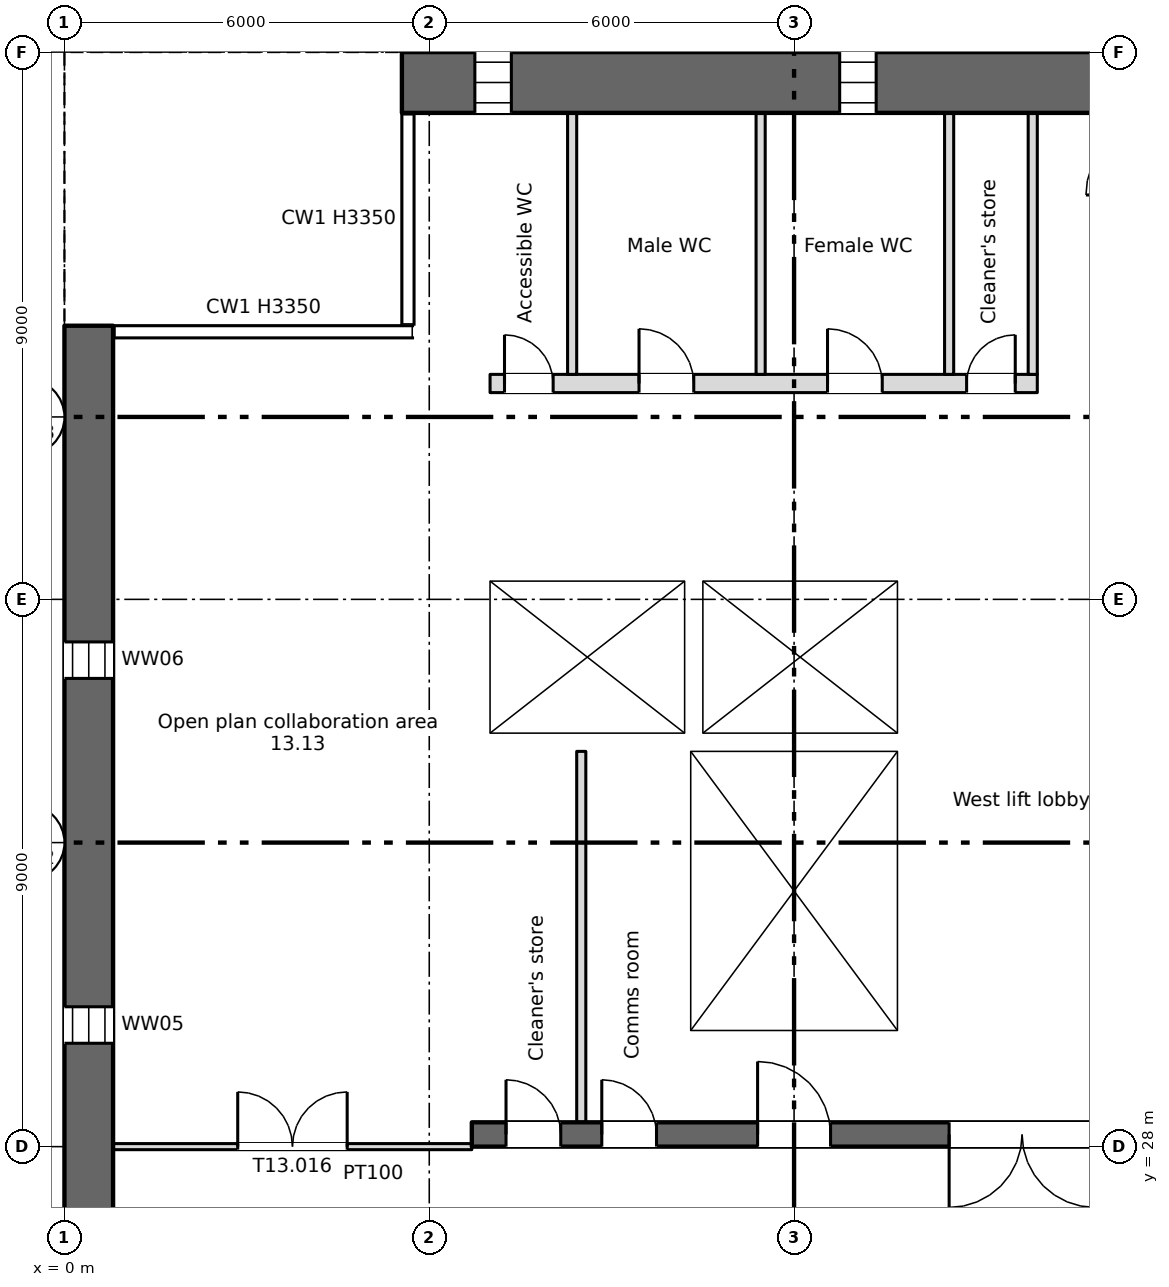
"""IFC4 building model, lengths in metres.
Left out: names, types, materials, properties, quantities, classifications, styles, units other than length and angle.
Written with IfcOpenShell. Run it as: python <this file> out.ifc"""

import sys

from ifc_helpers import new_model, si_unit, direction, frame, frame_2d, origin, place, context, subcontext, project, spatial, rectangle, extrude, element, fill, save


model = new_model("IFC4")
c1 = context("Model", 3, precision=1e-05, world=origin(), true_north=direction((0.0, 1.0)))
c2 = subcontext(c1, "Body", "Model", "MODEL_VIEW")
j1 = project(units=[si_unit("LENGTHUNIT", "METRE"), si_unit("PLANEANGLEUNIT", "RADIAN")], contexts=[c1])
p1 = place(None, origin())
s1 = spatial("IfcSite", under=j1, at=p1, CompositionType="ELEMENT")
p2 = place(p1, origin())
s2 = spatial("IfcBuilding", under=s1, at=p2, CompositionType="ELEMENT")
p3 = place(p2, frame((0.0, 0.0, 67.5)))
s3 = spatial("IfcBuildingStorey", under=s2, at=p3, CompositionType="ELEMENT", Elevation=67.5)
p4 = place(p3, frame((0.4, 4.5, 0.0), z_axis=(0.0, 0.0, 1.0), x_axis=(0.0, 1.0, 0.0)))
e1 = element("IfcWall", 1, at=p4, inside=s3, PredefinedType="SHEAR", context=c2, shape_type="SweptSolid", body=[
    extrude(rectangle(XDim=37.0, YDim=0.8, at=frame_2d((18.5, 0.0))), origin(), (0.0, 0.0, 1.0), 3.35),
])
p5 = place(p4, frame((1.2, 0.0, 0.6)))
e2 = element("IfcOpeningElement", 2, at=p5, cuts=e1, PredefinedType="OPENING", context=c2, shape_type="SweptSolid", body=[
    extrude(rectangle(XDim=0.6, YDim=2.4, at=frame_2d((0.3, 1.2))), frame((0.0, 0.41, 0.0), z_axis=(0.0, -1.0, 0.0), x_axis=(1.0, 0.0, 0.0)), (0.0, 0.0, 1.0), 0.82),
])
p6 = place(p4, frame((7.2, 0.0, 0.6)))
e3 = element("IfcOpeningElement", 3, at=p6, cuts=e1, PredefinedType="OPENING", context=c2, shape_type="SweptSolid", body=[
    extrude(rectangle(XDim=0.6, YDim=2.4, at=frame_2d((0.3, 1.2))), frame((0.0, 0.41, 0.0), z_axis=(0.0, -1.0, 0.0), x_axis=(1.0, 0.0, 0.0)), (0.0, 0.0, 1.0), 0.82),
])
p7 = place(p4, frame((13.2, 0.0, 0.6)))
e4 = element("IfcOpeningElement", 4, at=p7, cuts=e1, PredefinedType="OPENING", context=c2, shape_type="SweptSolid", body=[
    extrude(rectangle(XDim=0.6, YDim=2.4, at=frame_2d((0.3, 1.2))), frame((0.0, 0.41, 0.0), z_axis=(0.0, -1.0, 0.0), x_axis=(1.0, 0.0, 0.0)), (0.0, 0.0, 1.0), 0.82),
])
p8 = place(p4, frame((19.2, 0.0, 0.6)))
e5 = element("IfcOpeningElement", 5, at=p8, cuts=e1, PredefinedType="OPENING", context=c2, shape_type="SweptSolid", body=[
    extrude(rectangle(XDim=0.6, YDim=2.4, at=frame_2d((0.3, 1.2))), frame((0.0, 0.41, 0.0), z_axis=(0.0, -1.0, 0.0), x_axis=(1.0, 0.0, 0.0)), (0.0, 0.0, 1.0), 0.82),
])
p9 = place(p4, frame((25.2, 0.0, 0.6)))
e6 = element("IfcOpeningElement", 6, at=p9, cuts=e1, PredefinedType="OPENING", context=c2, shape_type="SweptSolid", body=[
    extrude(rectangle(XDim=0.6, YDim=2.4, at=frame_2d((0.3, 1.2))), frame((0.0, 0.41, 0.0), z_axis=(0.0, -1.0, 0.0), x_axis=(1.0, 0.0, 0.0)), (0.0, 0.0, 1.0), 0.82),
])
p10 = place(p4, frame((31.2, 0.0, 0.6)))
e7 = element("IfcOpeningElement", 7, at=p10, cuts=e1, PredefinedType="OPENING", context=c2, shape_type="SweptSolid", body=[
    extrude(rectangle(XDim=0.6, YDim=2.4, at=frame_2d((0.3, 1.2))), frame((0.0, 0.41, 0.0), z_axis=(0.0, -1.0, 0.0), x_axis=(1.0, 0.0, 0.0)), (0.0, 0.0, 1.0), 0.82),
])
p11 = place(p3, frame((5.55, 45.5, 0.0), z_axis=(0.0, 0.0, 1.0), x_axis=(1.0, 0.0, 0.0)))
e8 = element("IfcWall", 8, at=p11, inside=s3, PredefinedType="SHEAR", context=c2, shape_type="SweptSolid", body=[
    extrude(rectangle(XDim=66.9, YDim=1.0, at=frame_2d((33.45, 0.0))), origin(), (0.0, 0.0, 1.0), 3.35),
])
p12 = place(p11, frame((1.2, 0.0, 0.6)))
e9 = element("IfcOpeningElement", 9, at=p12, cuts=e8, PredefinedType="OPENING", context=c2, shape_type="SweptSolid", body=[
    extrude(rectangle(XDim=0.6, YDim=2.4, at=frame_2d((0.3, 1.2))), frame((0.0, 0.51, 0.0), z_axis=(0.0, -1.0, 0.0), x_axis=(1.0, 0.0, 0.0)), (0.0, 0.0, 1.0), 1.02),
])
p13 = place(p11, frame((7.2, 0.0, 0.6)))
e10 = element("IfcOpeningElement", 10, at=p13, cuts=e8, PredefinedType="OPENING", context=c2, shape_type="SweptSolid", body=[
    extrude(rectangle(XDim=0.6, YDim=2.4, at=frame_2d((0.3, 1.2))), frame((0.0, 0.51, 0.0), z_axis=(0.0, -1.0, 0.0), x_axis=(1.0, 0.0, 0.0)), (0.0, 0.0, 1.0), 1.02),
])
p14 = place(p11, frame((61.2, 0.0, 0.6)))
e11 = element("IfcOpeningElement", 11, at=p14, cuts=e8, PredefinedType="OPENING", context=c2, shape_type="SweptSolid", body=[
    extrude(rectangle(XDim=0.6, YDim=2.4, at=frame_2d((0.3, 1.2))), frame((0.0, 0.51, 0.0), z_axis=(0.0, -1.0, 0.0), x_axis=(1.0, 0.0, 0.0)), (0.0, 0.0, 1.0), 1.02),
])
p15 = place(p3, frame((6.7, 28.2, 0.0), z_axis=(0.0, 0.0, 1.0), x_axis=(1.0, 0.0, 0.0)))
e12 = element("IfcWall", 12, at=p15, inside=s3, PredefinedType="SHEAR", context=c2, shape_type="SweptSolid", body=[
    extrude(rectangle(XDim=57.8, YDim=0.4, at=frame_2d((28.9, 0.0))), origin(), (0.0, 0.0, 1.0), 3.35),
])
p16 = place(p15, frame((12.562, 0.0, 0.0)))
e13 = element("IfcOpeningElement", 13, at=p16, cuts=e12, PredefinedType="OPENING", context=c2, shape_type="SweptSolid", body=[
    extrude(rectangle(XDim=0.9, YDim=2.1, at=frame_2d((0.45, 1.05))), frame((0.0, 0.21, 0.0), z_axis=(0.0, -1.0, 0.0), x_axis=(1.0, 0.0, 0.0)), (0.0, 0.0, 1.0), 0.42),
])
p17 = place(p15, frame((15.137, 0.0, 0.0)))
e14 = element("IfcOpeningElement", 14, at=p17, cuts=e12, PredefinedType="OPENING", context=c2, shape_type="SweptSolid", body=[
    extrude(rectangle(XDim=0.9, YDim=2.1, at=frame_2d((0.45, 1.05))), frame((0.0, 0.21, 0.0), z_axis=(0.0, -1.0, 0.0), x_axis=(1.0, 0.0, 0.0)), (0.0, 0.0, 1.0), 0.42),
])
p18 = place(p15, frame((49.85, 0.0, 0.0)))
e15 = element("IfcOpeningElement", 15, at=p18, cuts=e12, PredefinedType="OPENING", context=c2, shape_type="SweptSolid", body=[
    extrude(rectangle(XDim=0.9, YDim=2.1, at=frame_2d((0.45, 1.05))), frame((0.0, 0.21, 0.0), z_axis=(0.0, -1.0, 0.0), x_axis=(1.0, 0.0, 0.0)), (0.0, 0.0, 1.0), 0.42),
])
p19 = place(p15, frame((0.562, 0.0, 0.0)))
e16 = element("IfcOpeningElement", 16, at=p19, cuts=e12, PredefinedType="OPENING", context=c2, shape_type="SweptSolid", body=[
    extrude(rectangle(XDim=0.9, YDim=2.1, at=frame_2d((0.45, 1.05))), frame((0.0, 0.21, 0.0), z_axis=(0.0, -1.0, 0.0), x_axis=(1.0, 0.0, 0.0)), (0.0, 0.0, 1.0), 0.42),
])
p20 = place(p15, frame((2.137, 0.0, 0.0)))
e17 = element("IfcOpeningElement", 17, at=p20, cuts=e12, PredefinedType="OPENING", context=c2, shape_type="SweptSolid", body=[
    extrude(rectangle(XDim=0.9, YDim=2.1, at=frame_2d((0.45, 1.05))), frame((0.0, 0.21, 0.0), z_axis=(0.0, -1.0, 0.0), x_axis=(1.0, 0.0, 0.0)), (0.0, 0.0, 1.0), 0.42),
])
p21 = place(p15, frame((4.7, 0.0, 0.0)))
e18 = element("IfcOpeningElement", 18, at=p21, cuts=e12, PredefinedType="OPENING", context=c2, shape_type="SweptSolid", body=[
    extrude(rectangle(XDim=1.2, YDim=2.1, at=frame_2d((0.6, 1.05))), frame((0.0, 0.21, 0.0), z_axis=(0.0, -1.0, 0.0), x_axis=(1.0, 0.0, 0.0)), (0.0, 0.0, 1.0), 0.42),
])
p22 = place(p15, frame((31.7, 0.0, 0.0)))
e19 = element("IfcOpeningElement", 19, at=p22, cuts=e12, PredefinedType="OPENING", context=c2, shape_type="SweptSolid", body=[
    extrude(rectangle(XDim=1.2, YDim=2.1, at=frame_2d((0.6, 1.05))), frame((0.0, 0.21, 0.0), z_axis=(0.0, -1.0, 0.0), x_axis=(1.0, 0.0, 0.0)), (0.0, 0.0, 1.0), 0.42),
])
p23 = place(p15, frame((55.2, 0.0, 0.0)))
e20 = element("IfcOpeningElement", 20, at=p23, cuts=e12, PredefinedType="OPENING", context=c2, shape_type="SweptSolid", body=[
    extrude(rectangle(XDim=1.2, YDim=2.1, at=frame_2d((0.6, 1.05))), frame((0.0, 0.21, 0.0), z_axis=(0.0, -1.0, 0.0), x_axis=(1.0, 0.0, 0.0)), (0.0, 0.0, 1.0), 0.42),
])
p24 = place(p15, frame((21.7, 0.0, 0.0)))
e21 = element("IfcOpeningElement", 21, at=p24, cuts=e12, PredefinedType="OPENING", context=c2, shape_type="SweptSolid", body=[
    extrude(rectangle(XDim=1.2, YDim=2.1, at=frame_2d((0.6, 1.05))), frame((0.0, 0.21, 0.0), z_axis=(0.0, -1.0, 0.0), x_axis=(1.0, 0.0, 0.0)), (0.0, 0.0, 1.0), 0.42),
])
p25 = place(p15, frame((41.7, 0.0, 0.0)))
e22 = element("IfcOpeningElement", 22, at=p25, cuts=e12, PredefinedType="OPENING", context=c2, shape_type="SweptSolid", body=[
    extrude(rectangle(XDim=1.2, YDim=2.1, at=frame_2d((0.6, 1.05))), frame((0.0, 0.21, 0.0), z_axis=(0.0, -1.0, 0.0), x_axis=(1.0, 0.0, 0.0)), (0.0, 0.0, 1.0), 0.42),
])
p26 = place(p15, frame((24.85, 0.0, 0.0)))
e23 = element("IfcOpeningElement", 23, at=p26, cuts=e12, PredefinedType="OPENING", context=c2, shape_type="SweptSolid", body=[
    extrude(rectangle(XDim=2.4, YDim=2.1, at=frame_2d((1.2, 1.05))), frame((0.0, 0.21, 0.0), z_axis=(0.0, -1.0, 0.0), x_axis=(1.0, 0.0, 0.0)), (0.0, 0.0, 1.0), 0.42),
])
p27 = place(p15, frame((37.35, 0.0, 0.0)))
e24 = element("IfcOpeningElement", 24, at=p27, cuts=e12, PredefinedType="OPENING", context=c2, shape_type="SweptSolid", body=[
    extrude(rectangle(XDim=2.4, YDim=2.1, at=frame_2d((1.2, 1.05))), frame((0.0, 0.21, 0.0), z_axis=(0.0, -1.0, 0.0), x_axis=(1.0, 0.0, 0.0)), (0.0, 0.0, 1.0), 0.42),
])
p28 = place(p15, frame((7.85, 0.0, 0.0)))
e25 = element("IfcOpeningElement", 25, at=p28, cuts=e12, PredefinedType="OPENING", context=c2, shape_type="SweptSolid", body=[
    extrude(rectangle(XDim=2.4, YDim=2.1, at=frame_2d((1.2, 1.05))), frame((0.0, 0.21, 0.0), z_axis=(0.0, -1.0, 0.0), x_axis=(1.0, 0.0, 0.0)), (0.0, 0.0, 1.0), 0.42),
])
p29 = place(p15, frame((28.85, 0.0, 0.0)))
e26 = element("IfcOpeningElement", 26, at=p29, cuts=e12, PredefinedType="OPENING", context=c2, shape_type="SweptSolid", body=[
    extrude(rectangle(XDim=0.9, YDim=2.1, at=frame_2d((0.45, 1.05))), frame((0.0, 0.21, 0.0), z_axis=(0.0, -1.0, 0.0), x_axis=(1.0, 0.0, 0.0)), (0.0, 0.0, 1.0), 0.42),
])
p30 = place(p15, frame((34.85, 0.0, 0.0)))
e27 = element("IfcOpeningElement", 27, at=p30, cuts=e12, PredefinedType="OPENING", context=c2, shape_type="SweptSolid", body=[
    extrude(rectangle(XDim=0.9, YDim=2.1, at=frame_2d((0.45, 1.05))), frame((0.0, 0.21, 0.0), z_axis=(0.0, -1.0, 0.0), x_axis=(1.0, 0.0, 0.0)), (0.0, 0.0, 1.0), 0.42),
])
p31 = place(p3, frame((6.85, 28.4, 0.0), z_axis=(0.0, 0.0, 1.0), x_axis=(0.0, 1.0, 0.0)))
e28 = element("IfcWall", 28, at=p31, inside=s3, PredefinedType="SHEAR", context=c2, shape_type="SweptSolid", body=[
    extrude(rectangle(XDim=16.6, YDim=0.3, at=frame_2d((8.3, 0.0))), origin(), (0.0, 0.0, 1.0), 3.35),
])
for number, where, z_axis, x_axis in (
    (29, (10.15, 28.4, 0.0), (0.0, 0.0, 1.0), (0.0, 1.0, 0.0)),
    (30, (13.85, 28.4, 0.0), (0.0, 0.0, 1.0), (0.0, 1.0, 0.0)),
):
    element("IfcWall", number, at=place(p3, frame(where, z_axis=z_axis, x_axis=x_axis)), inside=s3, PredefinedType="SHEAR", context=c2, shape_type="SweptSolid", body=[
        extrude(rectangle(XDim=6.1, YDim=0.3, at=frame_2d((3.05, 0.0))), origin(), (0.0, 0.0, 1.0), 3.35),
    ])
for number, where, z_axis, x_axis in (
    (31, (7.0, 34.65, 0.0), (0.0, 0.0, 1.0), (1.0, 0.0, 0.0)),
    (32, (7.0, 37.45, 0.0), (0.0, 0.0, 1.0), (1.0, 0.0, 0.0)),
):
    element("IfcWall", number, at=place(p3, frame(where, z_axis=z_axis, x_axis=x_axis)), inside=s3, PredefinedType="SHEAR", context=c2, shape_type="SweptSolid", body=[
        extrude(rectangle(XDim=7.0, YDim=0.3, at=frame_2d((3.5, 0.0))), origin(), (0.0, 0.0, 1.0), 3.35),
    ])
p32 = place(p3, frame((13.85, 34.8, 0.0), z_axis=(0.0, 0.0, 1.0), x_axis=(0.0, 1.0, 0.0)))
e33 = element("IfcWall", 33, at=p32, inside=s3, PredefinedType="SHEAR", context=c2, shape_type="SweptSolid", body=[
    extrude(rectangle(XDim=2.5, YDim=0.3, at=frame_2d((1.25, 0.0))), origin(), (0.0, 0.0, 1.0), 3.35),
])
p33 = place(p3, frame((7.0, 40.55, 0.0), z_axis=(0.0, 0.0, 1.0), x_axis=(1.0, 0.0, 0.0)))
e34 = element("IfcWall", 34, at=p33, inside=s3, PredefinedType="PARTITIONING", context=c2, shape_type="SweptSolid", body=[
    extrude(rectangle(XDim=9.0, YDim=0.3, at=frame_2d((4.5, 0.0))), origin(), (0.0, 0.0, 1.0), 3.35),
])
p34 = place(p33, frame((0.238, 0.0, 0.0)))
e35 = element("IfcOpeningElement", 35, at=p34, cuts=e34, PredefinedType="OPENING", context=c2, shape_type="SweptSolid", body=[
    extrude(rectangle(XDim=0.8, YDim=2.1, at=frame_2d((0.4, 1.05))), frame((0.0, 0.16, 0.0), z_axis=(0.0, -1.0, 0.0), x_axis=(1.0, 0.0, 0.0)), (0.0, 0.0, 1.0), 0.32),
])
p35 = place(p33, frame((2.45, 0.0, 0.0)))
e36 = element("IfcOpeningElement", 36, at=p35, cuts=e34, PredefinedType="OPENING", context=c2, shape_type="SweptSolid", body=[
    extrude(rectangle(XDim=0.9, YDim=2.1, at=frame_2d((0.45, 1.05))), frame((0.0, 0.16, 0.0), z_axis=(0.0, -1.0, 0.0), x_axis=(1.0, 0.0, 0.0)), (0.0, 0.0, 1.0), 0.32),
])
p36 = place(p33, frame((5.55, 0.0, 0.0)))
e37 = element("IfcOpeningElement", 37, at=p36, cuts=e34, PredefinedType="OPENING", context=c2, shape_type="SweptSolid", body=[
    extrude(rectangle(XDim=0.9, YDim=2.1, at=frame_2d((0.45, 1.05))), frame((0.0, 0.16, 0.0), z_axis=(0.0, -1.0, 0.0), x_axis=(1.0, 0.0, 0.0)), (0.0, 0.0, 1.0), 0.32),
])
p37 = place(p33, frame((7.837, 0.0, 0.0)))
e38 = element("IfcOpeningElement", 38, at=p37, cuts=e34, PredefinedType="OPENING", context=c2, shape_type="SweptSolid", body=[
    extrude(rectangle(XDim=0.8, YDim=2.1, at=frame_2d((0.4, 1.05))), frame((0.0, 0.16, 0.0), z_axis=(0.0, -1.0, 0.0), x_axis=(1.0, 0.0, 0.0)), (0.0, 0.0, 1.0), 0.32),
])
p38 = place(p3, frame((10.35, 34.8, 0.0), z_axis=(0.0, 0.0, 1.0), x_axis=(0.0, 1.0, 0.0)))
e39 = element("IfcWall", 39, at=p38, inside=s3, PredefinedType="SHEAR", context=c2, shape_type="SweptSolid", body=[
    extrude(rectangle(XDim=2.5, YDim=0.3, at=frame_2d((1.25, 0.0))), origin(), (0.0, 0.0, 1.0), 3.35),
])
p39 = place(p3, frame((15.925, 40.7, 0.0), z_axis=(0.0, 0.0, 1.0), x_axis=(0.0, 1.0, 0.0)))
e40 = element("IfcWall", 40, at=p39, inside=s3, PredefinedType="PARTITIONING", context=c2, shape_type="SweptSolid", body=[
    extrude(rectangle(XDim=4.3, YDim=0.15, at=frame_2d((2.15, 0.0))), origin(), (0.0, 0.0, 1.0), 3.35),
])
p40 = place(p3, frame((8.5, 28.4, 0.0), z_axis=(0.0, 0.0, 1.0), x_axis=(0.0, 1.0, 0.0)))
e41 = element("IfcWall", 41, at=p40, inside=s3, PredefinedType="PARTITIONING", context=c2, shape_type="SweptSolid", body=[
    extrude(rectangle(XDim=6.1, YDim=0.15, at=frame_2d((3.05, 0.0))), origin(), (0.0, 0.0, 1.0), 3.35),
])
for number, where, z_axis, x_axis in (
    (42, (8.35, 40.7, 0.0), (0.0, 0.0, 1.0), (0.0, 1.0, 0.0)),
    (43, (11.45, 40.7, 0.0), (0.0, 0.0, 1.0), (0.0, 1.0, 0.0)),
    (44, (14.55, 40.7, 0.0), (0.0, 0.0, 1.0), (0.0, 1.0, 0.0)),
):
    element("IfcWall", number, at=place(p3, frame(where, z_axis=z_axis, x_axis=x_axis)), inside=s3, PredefinedType="PARTITIONING", context=c2, shape_type="SweptSolid", body=[
        extrude(rectangle(XDim=4.3, YDim=0.15, at=frame_2d((2.15, 0.0))), origin(), (0.0, 0.0, 1.0), 3.35),
    ])
p41 = place(p3, frame((0.8, 28.0, 0.0), z_axis=(0.0, 0.0, 1.0), x_axis=(1.0, 0.0, 0.0)))
e45 = element("IfcWall", 45, at=p41, inside=s3, PredefinedType="PARTITIONING", context=c2, shape_type="SweptSolid", body=[
    extrude(rectangle(XDim=5.9, YDim=0.1, at=frame_2d((2.95, 0.0))), origin(), (0.0, 0.0, 1.0), 3.35),
])
p42 = place(p41, frame((2.05, 0.0, 0.0)))
e46 = element("IfcOpeningElement", 46, at=p42, cuts=e45, PredefinedType="OPENING", context=c2, shape_type="SweptSolid", body=[
    extrude(rectangle(XDim=1.8, YDim=2.1, at=frame_2d((0.9, 1.05))), frame((0.0, 0.06, 0.0), z_axis=(0.0, -1.0, 0.0), x_axis=(1.0, 0.0, 0.0)), (0.0, 0.0, 1.0), 0.12),
])
p43 = place(p12, origin())
e47 = element("IfcWindow", 47, at=p43, inside=s3, PartitioningType="SINGLE_PANEL", PredefinedType="WINDOW", context=c2, shape_type="SweptSolid", body=[
    extrude(rectangle(XDim=0.6, YDim=2.4, at=frame_2d((0.3, 1.2))), frame((0.0, 0.03, 0.0), z_axis=(0.0, -1.0, 0.0), x_axis=(1.0, 0.0, 0.0)), (0.0, 0.0, 1.0), 0.06),
])
fill(e9, e47)
p44 = place(p13, origin())
e48 = element("IfcWindow", 48, at=p44, inside=s3, PartitioningType="SINGLE_PANEL", PredefinedType="WINDOW", context=c2, shape_type="SweptSolid", body=[
    extrude(rectangle(XDim=0.6, YDim=2.4, at=frame_2d((0.3, 1.2))), frame((0.0, 0.03, 0.0), z_axis=(0.0, -1.0, 0.0), x_axis=(1.0, 0.0, 0.0)), (0.0, 0.0, 1.0), 0.06),
])
fill(e10, e48)
p45 = place(p9, origin())
e49 = element("IfcWindow", 49, at=p45, inside=s3, PartitioningType="SINGLE_PANEL", PredefinedType="WINDOW", context=c2, shape_type="SweptSolid", body=[
    extrude(rectangle(XDim=0.6, YDim=2.4, at=frame_2d((0.3, 1.2))), frame((0.0, 0.03, 0.0), z_axis=(0.0, -1.0, 0.0), x_axis=(1.0, 0.0, 0.0)), (0.0, 0.0, 1.0), 0.06),
])
fill(e6, e49)
p46 = place(p10, origin())
e50 = element("IfcWindow", 50, at=p46, inside=s3, PartitioningType="SINGLE_PANEL", PredefinedType="WINDOW", context=c2, shape_type="SweptSolid", body=[
    extrude(rectangle(XDim=0.6, YDim=2.4, at=frame_2d((0.3, 1.2))), frame((0.0, 0.03, 0.0), z_axis=(0.0, -1.0, 0.0), x_axis=(1.0, 0.0, 0.0)), (0.0, 0.0, 1.0), 0.06),
])
fill(e7, e50)
p47 = place(p19, origin())
e51 = element("IfcDoor", 51, at=p47, inside=s3, OperationType="SINGLE_SWING_LEFT", PredefinedType="DOOR", context=c2, shape_type="SweptSolid", body=[
    extrude(rectangle(XDim=0.9, YDim=2.1, at=frame_2d((0.45, 1.05))), frame((0.0, 0.025, 0.0), z_axis=(0.0, -1.0, 0.0), x_axis=(1.0, 0.0, 0.0)), (0.0, 0.0, 1.0), 0.05),
])
fill(e16, e51)
p48 = place(p20, origin())
e52 = element("IfcDoor", 52, at=p48, inside=s3, OperationType="SINGLE_SWING_LEFT", PredefinedType="DOOR", context=c2, shape_type="SweptSolid", body=[
    extrude(rectangle(XDim=0.9, YDim=2.1, at=frame_2d((0.45, 1.05))), frame((0.0, 0.025, 0.0), z_axis=(0.0, -1.0, 0.0), x_axis=(1.0, 0.0, 0.0)), (0.0, 0.0, 1.0), 0.05),
])
fill(e17, e52)
p49 = place(p34, origin())
e53 = element("IfcDoor", 53, at=p49, inside=s3, OperationType="SINGLE_SWING_LEFT", PredefinedType="DOOR", context=c2, shape_type="SweptSolid", body=[
    extrude(rectangle(XDim=0.8, YDim=2.1, at=frame_2d((0.4, 1.05))), frame((0.0, 0.025, 0.0), z_axis=(0.0, -1.0, 0.0), x_axis=(1.0, 0.0, 0.0)), (0.0, 0.0, 1.0), 0.05),
])
fill(e35, e53)
p50 = place(p35, origin())
e54 = element("IfcDoor", 54, at=p50, inside=s3, OperationType="SINGLE_SWING_LEFT", PredefinedType="DOOR", context=c2, shape_type="SweptSolid", body=[
    extrude(rectangle(XDim=0.9, YDim=2.1, at=frame_2d((0.45, 1.05))), frame((0.0, 0.025, 0.0), z_axis=(0.0, -1.0, 0.0), x_axis=(1.0, 0.0, 0.0)), (0.0, 0.0, 1.0), 0.05),
])
fill(e36, e54)
p51 = place(p36, origin())
e55 = element("IfcDoor", 55, at=p51, inside=s3, OperationType="SINGLE_SWING_LEFT", PredefinedType="DOOR", context=c2, shape_type="SweptSolid", body=[
    extrude(rectangle(XDim=0.9, YDim=2.1, at=frame_2d((0.45, 1.05))), frame((0.0, 0.025, 0.0), z_axis=(0.0, -1.0, 0.0), x_axis=(1.0, 0.0, 0.0)), (0.0, 0.0, 1.0), 0.05),
])
fill(e37, e55)
p52 = place(p37, origin())
e56 = element("IfcDoor", 56, at=p52, inside=s3, OperationType="SINGLE_SWING_RIGHT", PredefinedType="DOOR", context=c2, shape_type="SweptSolid", body=[
    extrude(rectangle(XDim=0.8, YDim=2.1, at=frame_2d((0.4, 1.05))), frame((0.0, 0.025, 0.0), z_axis=(0.0, -1.0, 0.0), x_axis=(1.0, 0.0, 0.0)), (0.0, 0.0, 1.0), 0.05),
])
fill(e38, e56)
p53 = place(p21, origin())
e57 = element("IfcDoor", 57, at=p53, inside=s3, OperationType="SINGLE_SWING_LEFT", PredefinedType="DOOR", context=c2, shape_type="SweptSolid", body=[
    extrude(rectangle(XDim=1.2, YDim=2.1, at=frame_2d((0.6, 1.05))), frame((0.0, 0.025, 0.0), z_axis=(0.0, -1.0, 0.0), x_axis=(1.0, 0.0, 0.0)), (0.0, 0.0, 1.0), 0.05),
])
fill(e18, e57)
p54 = place(p28, origin())
e58 = element("IfcDoor", 58, at=p54, inside=s3, OperationType="DOUBLE_DOOR_SINGLE_SWING", PredefinedType="DOOR", context=c2, shape_type="SweptSolid", body=[
    extrude(rectangle(XDim=2.4, YDim=2.1, at=frame_2d((1.2, 1.05))), frame((0.0, 0.025, 0.0), z_axis=(0.0, -1.0, 0.0), x_axis=(1.0, 0.0, 0.0)), (0.0, 0.0, 1.0), 0.05),
])
fill(e25, e58)
p55 = place(p42, origin())
e59 = element("IfcDoor", 59, at=p55, inside=s3, OperationType="DOUBLE_DOOR_SINGLE_SWING", PredefinedType="DOOR", context=c2, shape_type="SweptSolid", body=[
    extrude(rectangle(XDim=1.8, YDim=2.1, at=frame_2d((0.9, 1.05))), frame((0.0, 0.025, 0.0), z_axis=(0.0, -1.0, 0.0), x_axis=(1.0, 0.0, 0.0)), (0.0, 0.0, 1.0), 0.05),
])
fill(e46, e59)
save(model, sys.argv[1])
